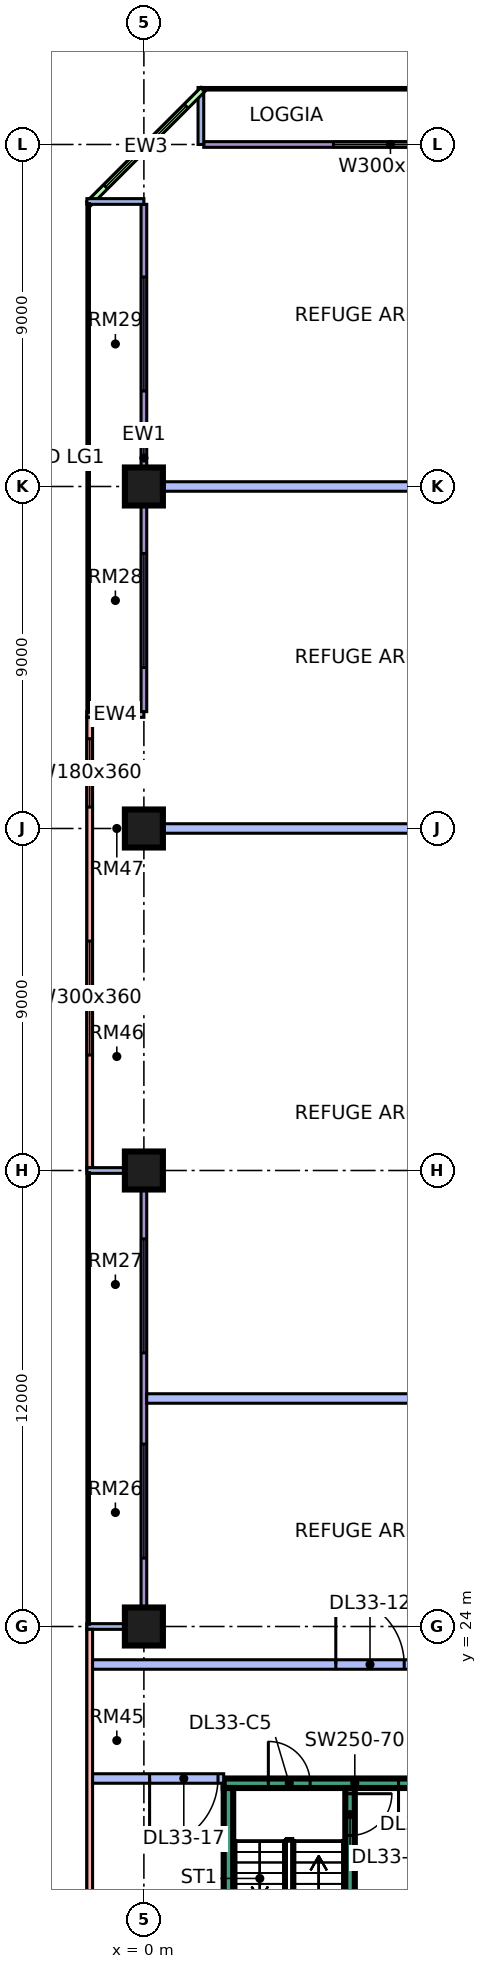
"""IFC4 building model, lengths in metres.
Left out: names, types, materials, properties, quantities, classifications, styles, units other than length and angle.
Written with IfcOpenShell. Run it as: python <this file> out.ifc"""

import sys

from ifc_helpers import new_model, si_unit, direction, frame, frame_2d, origin, origin_2d, place, context, subcontext, project, spatial, rectangle, extrude, element, fill, save


model = new_model("IFC4")
c1 = context("Model", 3, precision=1e-05, world=origin(), true_north=direction((0.0, 1.0)))
c2 = subcontext(c1, "Body", "Model", "MODEL_VIEW")
j1 = project(units=[si_unit("LENGTHUNIT", "METRE"), si_unit("PLANEANGLEUNIT", "RADIAN")], contexts=[c1])
p1 = place(None, origin())
s1 = spatial("IfcSite", under=j1, at=p1, CompositionType="ELEMENT")
p2 = place(p1, origin())
s2 = spatial("IfcBuilding", under=s1, at=p2, CompositionType="ELEMENT")
p3 = place(p2, frame((0.0, 0.0, 140.65)))
s3 = spatial("IfcBuildingStorey", under=s2, at=p3, CompositionType="ELEMENT", Elevation=140.65)
for number, where, z_axis, x_axis in (
    (1, (0.0, 24.0, 0.0), (0.0, 0.0, 1.0), (1.0, 0.0, 0.0)),
    (2, (0.0, 36.0, 0.0), (0.0, 0.0, 1.0), (1.0, 0.0, 0.0)),
):
    element("IfcColumn", number, at=place(p3, frame(where, z_axis=z_axis, x_axis=x_axis)), inside=s3, PredefinedType="COLUMN", context=c2, shape_type="SweptSolid", body=[
        extrude(rectangle(XDim=1.0, YDim=1.0, at=origin_2d()), origin(), (0.0, 0.0, 1.0), 5.5),
    ])
p4 = place(p3, frame((0.0, 45.0, 0.0), z_axis=(0.0, 0.0, 1.0), x_axis=(1.0, 0.0, 0.0)))
e3 = element("IfcColumn", 3, at=p4, inside=s3, PredefinedType="COLUMN", context=c2, shape_type="SweptSolid", body=[
    extrude(rectangle(XDim=1.0, YDim=1.0, at=origin_2d()), origin(), (0.0, 0.0, 1.0), 5.5),
])
p5 = place(p3, frame((0.0, 54.0, 0.0), z_axis=(0.0, 0.0, 1.0), x_axis=(1.0, 0.0, 0.0)))
e4 = element("IfcColumn", 4, at=p5, inside=s3, PredefinedType="COLUMN", context=c2, shape_type="SweptSolid", body=[
    extrude(rectangle(XDim=1.0, YDim=1.0, at=origin_2d()), origin(), (0.0, 0.0, 1.0), 5.5),
])
p6 = place(p3, frame((2.1, 19.875, 0.0), z_axis=(0.0, 0.0, 1.0), x_axis=(1.0, 0.0, 0.0)))
e5 = element("IfcWall", 5, at=p6, inside=s3, PredefinedType="SHEAR", context=c2, shape_type="SweptSolid", body=[
    extrude(rectangle(XDim=6.9, YDim=0.25, at=frame_2d((3.45, 0.0))), origin(), (0.0, 0.0, 1.0), 5.5),
])
p7 = place(p6, frame((1.175, 0.0, 0.0)))
e6 = element("IfcOpeningElement", 6, at=p7, cuts=e5, PredefinedType="OPENING", context=c2, shape_type="SweptSolid", body=[
    extrude(rectangle(XDim=1.1, YDim=2.2, at=frame_2d((0.55, 1.1))), frame((0.0, 0.135, 0.0), z_axis=(0.0, -1.0, 0.0), x_axis=(1.0, 0.0, 0.0)), (0.0, 0.0, 1.0), 0.27),
])
p8 = place(p6, frame((4.6, 0.0, 0.0)))
e7 = element("IfcOpeningElement", 7, at=p8, cuts=e5, PredefinedType="OPENING", context=c2, shape_type="SweptSolid", body=[
    extrude(rectangle(XDim=1.2, YDim=2.2, at=frame_2d((0.6, 1.1))), frame((0.0, 0.135, 0.0), z_axis=(0.0, -1.0, 0.0), x_axis=(1.0, 0.0, 0.0)), (0.0, 0.0, 1.0), 0.27),
])
p9 = place(p3, frame((2.225, 13.25, 0.0), z_axis=(0.0, 0.0, 1.0), x_axis=(0.0, 1.0, 0.0)))
e8 = element("IfcWall", 8, at=p9, inside=s3, PredefinedType="SHEAR", context=c2, shape_type="SweptSolid", body=[
    extrude(rectangle(XDim=6.5, YDim=0.25, at=frame_2d((3.25, 0.0))), origin(), (0.0, 0.0, 1.0), 5.5),
])
p10 = place(p3, frame((5.425, 13.25, 0.0), z_axis=(0.0, 0.0, 1.0), x_axis=(0.0, 1.0, 0.0)))
e9 = element("IfcWall", 9, at=p10, inside=s3, PredefinedType="SHEAR", context=c2, shape_type="SweptSolid", body=[
    extrude(rectangle(XDim=6.5, YDim=0.25, at=frame_2d((3.25, 0.0))), origin(), (0.0, 0.0, 1.0), 5.5),
])
p11 = place(p10, frame((5.25, 0.0, 0.0)))
e10 = element("IfcOpeningElement", 10, at=p11, cuts=e9, PredefinedType="OPENING", context=c2, shape_type="SweptSolid", body=[
    extrude(rectangle(XDim=1.1, YDim=2.2, at=frame_2d((0.55, 1.1))), frame((0.0, 0.135, 0.0), z_axis=(0.0, -1.0, 0.0), x_axis=(1.0, 0.0, 0.0)), (0.0, 0.0, 1.0), 0.27),
])
p12 = place(p3, frame((11.925, 63.0, 0.0), z_axis=(0.0, 0.0, 1.0), x_axis=(-1.0, 0.0, 0.0)))
e11 = element("IfcWall", 11, at=p12, inside=s3, PredefinedType="SOLIDWALL", context=c2, shape_type="SweptSolid", body=[
    extrude(rectangle(XDim=10.35, YDim=0.15, at=frame_2d((5.175, 0.0))), origin(), (0.0, 0.0, 1.0), 5.05),
])
p13 = place(p12, frame((3.938, 0.0, 0.45)))
e12 = element("IfcOpeningElement", 12, at=p13, cuts=e11, PredefinedType="OPENING", context=c2, shape_type="SweptSolid", body=[
    extrude(rectangle(XDim=3.0, YDim=3.6, at=frame_2d((1.5, 1.8))), frame((0.0, 0.085, 0.0), z_axis=(0.0, -1.0, 0.0), x_axis=(1.0, 0.0, 0.0)), (0.0, 0.0, 1.0), 0.17),
])
p14 = place(p3, frame((1.5, 64.5, 0.0), z_axis=(0.0, 0.0, 1.0), x_axis=(0.0, -1.0, 0.0)))
e13 = element("IfcWall", 13, at=p14, inside=s3, PredefinedType="SOLIDWALL", context=c2, shape_type="SweptSolid", body=[
    extrude(rectangle(XDim=1.5, YDim=0.15, at=frame_2d((0.75, 0.0))), origin(), (0.0, 0.0, 1.0), 5.05),
])
p15 = place(p3, frame((1.553, 64.447, 0.0), z_axis=(0.0, 0.0, 1.0), x_axis=(-0.707106781187, -0.707106781187, 0.0)))
e14 = element("IfcWall", 14, at=p15, inside=s3, PredefinedType="SOLIDWALL", context=c2, shape_type="SweptSolid", body=[
    extrude(rectangle(XDim=4.243, YDim=0.15, at=frame_2d((2.121, 0.0))), origin(), (0.0, 0.0, 1.0), 5.05),
])
p16 = place(p15, frame((0.621, 0.0, 0.45)))
e15 = element("IfcOpeningElement", 15, at=p16, cuts=e14, PredefinedType="OPENING", context=c2, shape_type="SweptSolid", body=[
    extrude(rectangle(XDim=3.0, YDim=3.6, at=frame_2d((1.5, 1.8))), frame((0.0, 0.085, 0.0), z_axis=(0.0, -1.0, 0.0), x_axis=(1.0, 0.0, 0.0)), (0.0, 0.0, 1.0), 0.17),
])
p17 = place(p3, frame((0.0, 61.425, 0.0), z_axis=(0.0, 0.0, 1.0), x_axis=(0.0, -1.0, 0.0)))
e16 = element("IfcWall", 16, at=p17, inside=s3, PredefinedType="SOLIDWALL", context=c2, shape_type="SweptSolid", body=[
    extrude(rectangle(XDim=13.35, YDim=0.15, at=frame_2d((6.675, 0.0))), origin(), (0.0, 0.0, 1.0), 5.05),
])
p18 = place(p17, frame((1.913, 0.0, 0.45)))
e17 = element("IfcOpeningElement", 17, at=p18, cuts=e16, PredefinedType="OPENING", context=c2, shape_type="SweptSolid", body=[
    extrude(rectangle(XDim=3.0, YDim=3.6, at=frame_2d((1.5, 1.8))), frame((0.0, 0.085, 0.0), z_axis=(0.0, -1.0, 0.0), x_axis=(1.0, 0.0, 0.0)), (0.0, 0.0, 1.0), 0.17),
])
p19 = place(p17, frame((9.188, 0.0, 0.45)))
e18 = element("IfcOpeningElement", 18, at=p19, cuts=e16, PredefinedType="OPENING", context=c2, shape_type="SweptSolid", body=[
    extrude(rectangle(XDim=3.0, YDim=3.6, at=frame_2d((1.5, 1.8))), frame((0.0, 0.085, 0.0), z_axis=(0.0, -1.0, 0.0), x_axis=(1.0, 0.0, 0.0)), (0.0, 0.0, 1.0), 0.17),
])
for number, where, z_axis, x_axis in (
    (19, (-1.5, 61.5, 0.0), (0.0, 0.0, 1.0), (1.0, 0.0, 0.0)),
    (20, (-1.5, 48.0, 0.0), (0.0, 0.0, 1.0), (1.0, 0.0, 0.0)),
):
    element("IfcWall", number, at=place(p3, frame(where, z_axis=z_axis, x_axis=x_axis)), inside=s3, PredefinedType="SOLIDWALL", context=c2, shape_type="SweptSolid", body=[
        extrude(rectangle(XDim=1.5, YDim=0.15, at=frame_2d((0.75, 0.0))), origin(), (0.0, 0.0, 1.0), 5.05),
    ])
p20 = place(p3, frame((-1.425, 47.925, 0.0), z_axis=(0.0, 0.0, 1.0), x_axis=(0.0, -1.0, 0.0)))
e21 = element("IfcWall", 21, at=p20, inside=s3, PredefinedType="SOLIDWALL", context=c2, shape_type="SweptSolid", body=[
    extrude(rectangle(XDim=11.85, YDim=0.15, at=frame_2d((5.925, 0.0))), origin(), (0.0, 0.0, 1.0), 5.05),
])
p21 = place(p20, frame((0.562, 0.0, 0.45)))
e22 = element("IfcOpeningElement", 22, at=p21, cuts=e21, PredefinedType="OPENING", context=c2, shape_type="SweptSolid", body=[
    extrude(rectangle(XDim=1.8, YDim=3.6, at=frame_2d((0.9, 1.8))), frame((0.0, 0.085, 0.0), z_axis=(0.0, -1.0, 0.0), x_axis=(1.0, 0.0, 0.0)), (0.0, 0.0, 1.0), 0.17),
])
p22 = place(p20, frame((5.887, 0.0, 0.45)))
e23 = element("IfcOpeningElement", 23, at=p22, cuts=e21, PredefinedType="OPENING", context=c2, shape_type="SweptSolid", body=[
    extrude(rectangle(XDim=3.0, YDim=3.6, at=frame_2d((1.5, 1.8))), frame((0.0, 0.085, 0.0), z_axis=(0.0, -1.0, 0.0), x_axis=(1.0, 0.0, 0.0)), (0.0, 0.0, 1.0), 0.17),
])
p23 = place(p3, frame((0.0, 35.925, 0.0), z_axis=(0.0, 0.0, 1.0), x_axis=(0.0, -1.0, 0.0)))
e24 = element("IfcWall", 24, at=p23, inside=s3, PredefinedType="SOLIDWALL", context=c2, shape_type="SweptSolid", body=[
    extrude(rectangle(XDim=11.85, YDim=0.15, at=frame_2d((5.925, 0.0))), origin(), (0.0, 0.0, 1.0), 5.05),
])
p24 = place(p23, frame((1.725, 0.0, 0.45)))
e25 = element("IfcOpeningElement", 25, at=p24, cuts=e24, PredefinedType="OPENING", context=c2, shape_type="SweptSolid", body=[
    extrude(rectangle(XDim=3.0, YDim=3.6, at=frame_2d((1.5, 1.8))), frame((0.0, 0.085, 0.0), z_axis=(0.0, -1.0, 0.0), x_axis=(1.0, 0.0, 0.0)), (0.0, 0.0, 1.0), 0.17),
])
p25 = place(p23, frame((7.125, 0.0, 0.45)))
e26 = element("IfcOpeningElement", 26, at=p25, cuts=e24, PredefinedType="OPENING", context=c2, shape_type="SweptSolid", body=[
    extrude(rectangle(XDim=3.0, YDim=3.6, at=frame_2d((1.5, 1.8))), frame((0.0, 0.085, 0.0), z_axis=(0.0, -1.0, 0.0), x_axis=(1.0, 0.0, 0.0)), (0.0, 0.0, 1.0), 0.17),
])
for number, where, z_axis, x_axis in (
    (27, (-1.5, 36.0, 0.0), (0.0, 0.0, 1.0), (1.0, 0.0, 0.0)),
    (28, (-1.5, 24.0, 0.0), (0.0, 0.0, 1.0), (1.0, 0.0, 0.0)),
):
    element("IfcWall", number, at=place(p3, frame(where, z_axis=z_axis, x_axis=x_axis)), inside=s3, PredefinedType="SOLIDWALL", context=c2, shape_type="SweptSolid", body=[
        extrude(rectangle(XDim=1.5, YDim=0.15, at=frame_2d((0.75, 0.0))), origin(), (0.0, 0.0, 1.0), 5.05),
    ])
p26 = place(p3, frame((-1.425, 23.925, 0.0), z_axis=(0.0, 0.0, 1.0), x_axis=(0.0, -1.0, 0.0)))
e29 = element("IfcWall", 29, at=p26, inside=s3, PredefinedType="SOLIDWALL", context=c2, shape_type="SweptSolid", body=[
    extrude(rectangle(XDim=11.425, YDim=0.15, at=frame_2d((5.712, 0.0))), origin(), (0.0, 0.0, 1.0), 5.05),
])
p27 = place(p3, frame((-1.35, 20.0, 0.0), z_axis=(0.0, 0.0, 1.0), x_axis=(1.0, 0.0, 0.0)))
e30 = element("IfcWall", 30, at=p27, inside=s3, PredefinedType="PARTITIONING", context=c2, shape_type="SweptSolid", body=[
    extrude(rectangle(XDim=3.45, YDim=0.25, at=frame_2d((1.725, 0.0))), origin(), (0.0, 0.0, 1.0), 5.05),
])
p28 = place(p27, frame((1.5, 0.0, 0.0)))
e31 = element("IfcOpeningElement", 31, at=p28, cuts=e30, PredefinedType="OPENING", context=c2, shape_type="SweptSolid", body=[
    extrude(rectangle(XDim=1.8, YDim=2.1, at=frame_2d((0.9, 1.05))), frame((0.0, 0.135, 0.0), z_axis=(0.0, -1.0, 0.0), x_axis=(1.0, 0.0, 0.0)), (0.0, 0.0, 1.0), 0.27),
])
p29 = place(p3, frame((-1.35, 23.0, 0.0), z_axis=(0.0, 0.0, 1.0), x_axis=(1.0, 0.0, 0.0)))
e32 = element("IfcWall", 32, at=p29, inside=s3, PredefinedType="PARTITIONING", context=c2, shape_type="SweptSolid", body=[
    extrude(rectangle(XDim=13.225, YDim=0.25, at=frame_2d((6.613, 0.0))), origin(), (0.0, 0.0, 1.0), 5.05),
])
p30 = place(p29, frame((6.4, 0.0, 0.0)))
e33 = element("IfcOpeningElement", 33, at=p30, cuts=e32, PredefinedType="OPENING", context=c2, shape_type="SweptSolid", body=[
    extrude(rectangle(XDim=1.8, YDim=2.1, at=frame_2d((0.9, 1.05))), frame((0.0, 0.135, 0.0), z_axis=(0.0, -1.0, 0.0), x_axis=(1.0, 0.0, 0.0)), (0.0, 0.0, 1.0), 0.27),
])
e34 = element("IfcWall", 34, at=p4, inside=s3, PredefinedType="PARTITIONING", context=c2, shape_type="SweptSolid", body=[
    extrude(rectangle(XDim=11.875, YDim=0.25, at=frame_2d((5.938, 0.0))), origin(), (0.0, 0.0, 1.0), 5.05),
])
for number, where, z_axis, x_axis in (
    (35, (0.074, 30.0, 0.0), (0.0, 0.0, 1.0), (1.0, 0.0, 0.0)),
    (36, (0.074, 54.0, 0.0), (0.0, 0.0, 1.0), (1.0, 0.0, 0.0)),
):
    element("IfcWall", number, at=place(p3, frame(where, z_axis=z_axis, x_axis=x_axis)), inside=s3, PredefinedType="PARTITIONING", context=c2, shape_type="SweptSolid", body=[
        extrude(rectangle(XDim=11.801, YDim=0.25, at=frame_2d((5.9, 0.0))), origin(), (0.0, 0.0, 1.0), 5.05),
    ])
p31 = place(p13, origin())
e37 = element("IfcWindow", 37, at=p31, inside=s3, PartitioningType="SINGLE_PANEL", PredefinedType="WINDOW", context=c2, shape_type="SweptSolid", body=[
    extrude(rectangle(XDim=3.0, YDim=3.6, at=frame_2d((1.5, 1.8))), frame((0.0, 0.03, 0.0), z_axis=(0.0, -1.0, 0.0), x_axis=(1.0, 0.0, 0.0)), (0.0, 0.0, 1.0), 0.06),
])
fill(e12, e37)
p32 = place(p16, origin())
e38 = element("IfcWindow", 38, at=p32, inside=s3, PartitioningType="SINGLE_PANEL", PredefinedType="WINDOW", context=c2, shape_type="SweptSolid", body=[
    extrude(rectangle(XDim=3.0, YDim=3.6, at=frame_2d((1.5, 1.8))), frame((0.0, 0.03, 0.0), z_axis=(0.0, -1.0, 0.0), x_axis=(1.0, 0.0, 0.0)), (0.0, 0.0, 1.0), 0.06),
])
fill(e15, e38)
p33 = place(p18, origin())
e39 = element("IfcWindow", 39, at=p33, inside=s3, PartitioningType="SINGLE_PANEL", PredefinedType="WINDOW", context=c2, shape_type="SweptSolid", body=[
    extrude(rectangle(XDim=3.0, YDim=3.6, at=frame_2d((1.5, 1.8))), frame((0.0, 0.03, 0.0), z_axis=(0.0, -1.0, 0.0), x_axis=(1.0, 0.0, 0.0)), (0.0, 0.0, 1.0), 0.06),
])
fill(e17, e39)
p34 = place(p19, origin())
e40 = element("IfcWindow", 40, at=p34, inside=s3, PartitioningType="SINGLE_PANEL", PredefinedType="WINDOW", context=c2, shape_type="SweptSolid", body=[
    extrude(rectangle(XDim=3.0, YDim=3.6, at=frame_2d((1.5, 1.8))), frame((0.0, 0.03, 0.0), z_axis=(0.0, -1.0, 0.0), x_axis=(1.0, 0.0, 0.0)), (0.0, 0.0, 1.0), 0.06),
])
fill(e18, e40)
p35 = place(p21, origin())
e41 = element("IfcWindow", 41, at=p35, inside=s3, PartitioningType="SINGLE_PANEL", PredefinedType="WINDOW", context=c2, shape_type="SweptSolid", body=[
    extrude(rectangle(XDim=1.8, YDim=3.6, at=frame_2d((0.9, 1.8))), frame((0.0, 0.03, 0.0), z_axis=(0.0, -1.0, 0.0), x_axis=(1.0, 0.0, 0.0)), (0.0, 0.0, 1.0), 0.06),
])
fill(e22, e41)
p36 = place(p22, origin())
e42 = element("IfcWindow", 42, at=p36, inside=s3, PartitioningType="SINGLE_PANEL", PredefinedType="WINDOW", context=c2, shape_type="SweptSolid", body=[
    extrude(rectangle(XDim=3.0, YDim=3.6, at=frame_2d((1.5, 1.8))), frame((0.0, 0.03, 0.0), z_axis=(0.0, -1.0, 0.0), x_axis=(1.0, 0.0, 0.0)), (0.0, 0.0, 1.0), 0.06),
])
fill(e23, e42)
p37 = place(p24, origin())
e43 = element("IfcWindow", 43, at=p37, inside=s3, PartitioningType="SINGLE_PANEL", PredefinedType="WINDOW", context=c2, shape_type="SweptSolid", body=[
    extrude(rectangle(XDim=3.0, YDim=3.6, at=frame_2d((1.5, 1.8))), frame((0.0, 0.03, 0.0), z_axis=(0.0, -1.0, 0.0), x_axis=(1.0, 0.0, 0.0)), (0.0, 0.0, 1.0), 0.06),
])
fill(e25, e43)
p38 = place(p25, origin())
e44 = element("IfcWindow", 44, at=p38, inside=s3, PartitioningType="SINGLE_PANEL", PredefinedType="WINDOW", context=c2, shape_type="SweptSolid", body=[
    extrude(rectangle(XDim=3.0, YDim=3.6, at=frame_2d((1.5, 1.8))), frame((0.0, 0.03, 0.0), z_axis=(0.0, -1.0, 0.0), x_axis=(1.0, 0.0, 0.0)), (0.0, 0.0, 1.0), 0.06),
])
fill(e26, e44)
p39 = place(p11, origin())
e45 = element("IfcDoor", 45, at=p39, inside=s3, OperationType="SINGLE_SWING_RIGHT", PredefinedType="DOOR", context=c2, shape_type="SweptSolid", body=[
    extrude(rectangle(XDim=1.1, YDim=2.2, at=frame_2d((0.55, 1.1))), frame((0.0, 0.025, 0.0), z_axis=(0.0, -1.0, 0.0), x_axis=(1.0, 0.0, 0.0)), (0.0, 0.0, 1.0), 0.05),
])
fill(e10, e45)
p40 = place(p7, origin())
e46 = element("IfcDoor", 46, at=p40, inside=s3, OperationType="SINGLE_SWING_LEFT", PredefinedType="DOOR", context=c2, shape_type="SweptSolid", body=[
    extrude(rectangle(XDim=1.1, YDim=2.2, at=frame_2d((0.55, 1.1))), frame((0.0, 0.025, 0.0), z_axis=(0.0, -1.0, 0.0), x_axis=(1.0, 0.0, 0.0)), (0.0, 0.0, 1.0), 0.05),
])
fill(e6, e46)
p41 = place(p8, frame((1.2, 0.0, 0.0), z_axis=(0.0, 0.0, 1.0), x_axis=(-1.0, 0.0, 0.0)))
e47 = element("IfcDoor", 47, at=p41, inside=s3, OperationType="SINGLE_SWING_LEFT", PredefinedType="DOOR", context=c2, shape_type="SweptSolid", body=[
    extrude(rectangle(XDim=1.2, YDim=2.2, at=frame_2d((0.6, 1.1))), frame((0.0, 0.025, 0.0), z_axis=(0.0, -1.0, 0.0), x_axis=(1.0, 0.0, 0.0)), (0.0, 0.0, 1.0), 0.05),
])
fill(e7, e47)
p42 = place(p30, origin())
e48 = element("IfcDoor", 48, at=p42, inside=s3, OperationType="DOUBLE_DOOR_SINGLE_SWING", PredefinedType="DOOR", context=c2, shape_type="SweptSolid", body=[
    extrude(rectangle(XDim=1.8, YDim=2.1, at=frame_2d((0.9, 1.05))), frame((0.0, 0.025, 0.0), z_axis=(0.0, -1.0, 0.0), x_axis=(1.0, 0.0, 0.0)), (0.0, 0.0, 1.0), 0.05),
])
fill(e33, e48)
p43 = place(p28, frame((1.8, 0.0, 0.0), z_axis=(0.0, 0.0, 1.0), x_axis=(-1.0, 0.0, 0.0)))
e49 = element("IfcDoor", 49, at=p43, inside=s3, OperationType="DOUBLE_DOOR_SINGLE_SWING", PredefinedType="DOOR", context=c2, shape_type="SweptSolid", body=[
    extrude(rectangle(XDim=1.8, YDim=2.1, at=frame_2d((0.9, 1.05))), frame((0.0, 0.025, 0.0), z_axis=(0.0, -1.0, 0.0), x_axis=(1.0, 0.0, 0.0)), (0.0, 0.0, 1.0), 0.05),
])
fill(e31, e49)
save(model, sys.argv[1])
